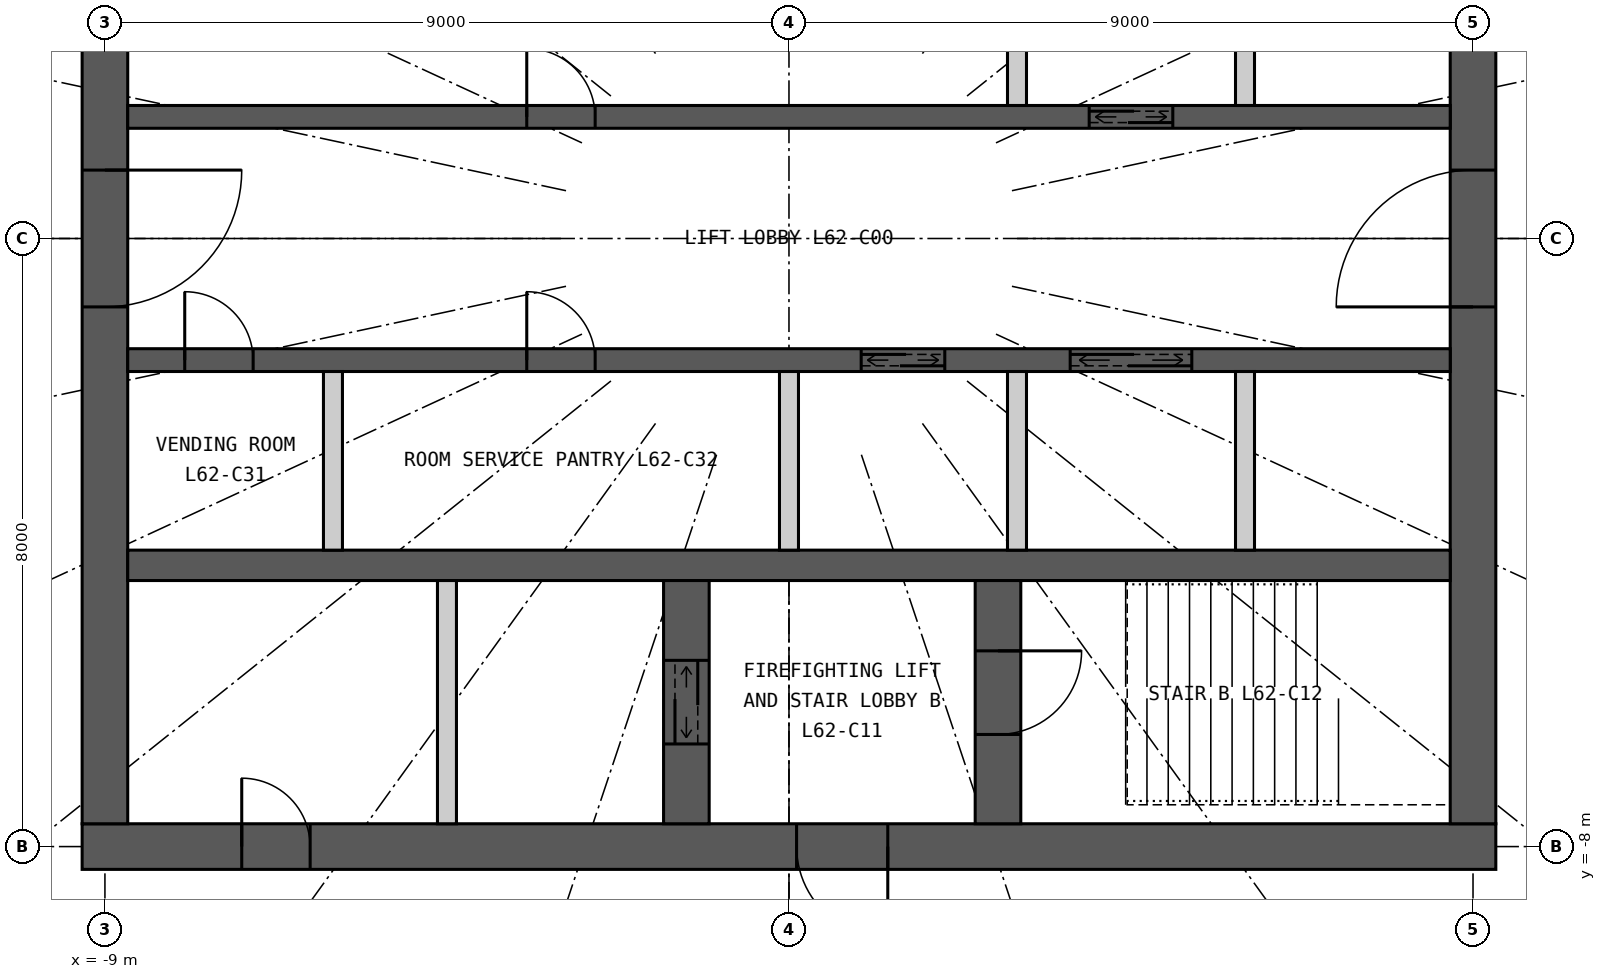
"""IFC4 building model, lengths in metres.
Left out: names, types, materials, properties, quantities, classifications, styles, units other than length and angle.
Written with IfcOpenShell. Run it as: python <this file> out.ifc"""

import sys

from ifc_helpers import new_model, si_unit, direction, frame, frame_2d, origin, place, context, subcontext, project, spatial, rectangle, extrude, element, fill, save


model = new_model("IFC4")
c1 = context("Model", 3, precision=1e-05, world=origin(), true_north=direction((0.0, 1.0)))
c2 = subcontext(c1, "Body", "Model", "MODEL_VIEW")
j1 = project(units=[si_unit("LENGTHUNIT", "METRE"), si_unit("PLANEANGLEUNIT", "RADIAN")], contexts=[c1])
p1 = place(None, origin())
s1 = spatial("IfcSite", under=j1, at=p1, CompositionType="ELEMENT")
p2 = place(p1, origin())
s2 = spatial("IfcBuilding", under=s1, at=p2, CompositionType="ELEMENT")
p3 = place(p2, frame((0.0, 0.0, 229.2)))
s3 = spatial("IfcBuildingStorey", under=s2, at=p3, CompositionType="ELEMENT", Elevation=229.2)
p4 = place(p3, frame((9.3, -8.0, 0.0), z_axis=(0.0, 0.0, 1.0), x_axis=(-1.0, 0.0, 0.0)))
e1 = element("IfcWall", 1, at=p4, inside=s3, PredefinedType="SHEAR", context=c2, shape_type="SweptSolid", body=[
    extrude(rectangle(XDim=18.6, YDim=0.6, at=frame_2d((9.3, 0.0))), origin(), (0.0, 0.0, 1.0), 3.3),
])
p5 = place(p4, frame((8.0, 0.0, 0.0)))
e2 = element("IfcOpeningElement", 2, at=p5, cuts=e1, PredefinedType="OPENING", context=c2, shape_type="SweptSolid", body=[
    extrude(rectangle(XDim=1.2, YDim=2.2, at=frame_2d((0.6, 1.1))), frame((0.0, 0.31, 0.0), z_axis=(0.0, -1.0, 0.0), x_axis=(1.0, 0.0, 0.0)), (0.0, 0.0, 1.0), 0.62),
])
p6 = place(p4, frame((15.6, 0.0, 0.0)))
e3 = element("IfcOpeningElement", 3, at=p6, cuts=e1, PredefinedType="OPENING", context=c2, shape_type="SweptSolid", body=[
    extrude(rectangle(XDim=0.9, YDim=2.2, at=frame_2d((0.45, 1.1))), frame((0.0, 0.31, 0.0), z_axis=(0.0, -1.0, 0.0), x_axis=(1.0, 0.0, 0.0)), (0.0, 0.0, 1.0), 0.62),
])
p7 = place(p3, frame((9.0, -7.7, 0.0), z_axis=(0.0, 0.0, 1.0), x_axis=(0.0, 1.0, 0.0)))
e4 = element("IfcWall", 4, at=p7, inside=s3, PredefinedType="SHEAR", context=c2, shape_type="SweptSolid", body=[
    extrude(rectangle(XDim=15.4, YDim=0.6, at=frame_2d((7.7, 0.0))), origin(), (0.0, 0.0, 1.0), 3.3),
])
p8 = place(p7, frame((6.8, 0.0, 0.0)))
e5 = element("IfcOpeningElement", 5, at=p8, cuts=e4, PredefinedType="OPENING", context=c2, shape_type="SweptSolid", body=[
    extrude(rectangle(XDim=1.8, YDim=2.2, at=frame_2d((0.9, 1.1))), frame((0.0, 0.31, 0.0), z_axis=(0.0, -1.0, 0.0), x_axis=(1.0, 0.0, 0.0)), (0.0, 0.0, 1.0), 0.62),
])
p9 = place(p3, frame((-9.0, 7.7, 0.0), z_axis=(0.0, 0.0, 1.0), x_axis=(0.0, -1.0, 0.0)))
e6 = element("IfcWall", 6, at=p9, inside=s3, PredefinedType="SHEAR", context=c2, shape_type="SweptSolid", body=[
    extrude(rectangle(XDim=15.4, YDim=0.6, at=frame_2d((7.7, 0.0))), origin(), (0.0, 0.0, 1.0), 3.3),
])
p10 = place(p9, frame((6.8, 0.0, 0.0)))
e7 = element("IfcOpeningElement", 7, at=p10, cuts=e6, PredefinedType="OPENING", context=c2, shape_type="SweptSolid", body=[
    extrude(rectangle(XDim=1.8, YDim=2.2, at=frame_2d((0.9, 1.1))), frame((0.0, 0.31, 0.0), z_axis=(0.0, -1.0, 0.0), x_axis=(1.0, 0.0, 0.0)), (0.0, 0.0, 1.0), 0.62),
])
p11 = place(p3, frame((-8.7, 1.6, 0.0), z_axis=(0.0, 0.0, 1.0), x_axis=(1.0, 0.0, 0.0)))
e8 = element("IfcWall", 8, at=p11, inside=s3, PredefinedType="SHEAR", context=c2, shape_type="SweptSolid", body=[
    extrude(rectangle(XDim=17.4, YDim=0.3, at=frame_2d((8.7, 0.0))), origin(), (0.0, 0.0, 1.0), 3.3),
])
p12 = place(p11, frame((12.65, 0.0, 0.0)))
e9 = element("IfcOpeningElement", 9, at=p12, cuts=e8, PredefinedType="OPENING", context=c2, shape_type="SweptSolid", body=[
    extrude(rectangle(XDim=1.1, YDim=2.2, at=frame_2d((0.55, 1.1))), frame((0.0, 0.16, 0.0), z_axis=(0.0, -1.0, 0.0), x_axis=(1.0, 0.0, 0.0)), (0.0, 0.0, 1.0), 0.32),
])
p13 = place(p11, frame((5.25, 0.0, 0.0)))
e10 = element("IfcOpeningElement", 10, at=p13, cuts=e8, PredefinedType="OPENING", context=c2, shape_type="SweptSolid", body=[
    extrude(rectangle(XDim=0.9, YDim=2.2, at=frame_2d((0.45, 1.1))), frame((0.0, 0.16, 0.0), z_axis=(0.0, -1.0, 0.0), x_axis=(1.0, 0.0, 0.0)), (0.0, 0.0, 1.0), 0.32),
])
p14 = place(p3, frame((-8.7, -4.3, 0.0), z_axis=(0.0, 0.0, 1.0), x_axis=(1.0, 0.0, 0.0)))
e11 = element("IfcWall", 11, at=p14, inside=s3, PredefinedType="SHEAR", context=c2, shape_type="SweptSolid", body=[
    extrude(rectangle(XDim=17.4, YDim=0.4, at=frame_2d((8.7, 0.0))), origin(), (0.0, 0.0, 1.0), 3.3),
])
p15 = place(p3, frame((-8.7, -1.6, 0.0), z_axis=(0.0, 0.0, 1.0), x_axis=(1.0, 0.0, 0.0)))
e12 = element("IfcWall", 12, at=p15, inside=s3, PredefinedType="SHEAR", context=c2, shape_type="SweptSolid", body=[
    extrude(rectangle(XDim=17.4, YDim=0.3, at=frame_2d((8.7, 0.0))), origin(), (0.0, 0.0, 1.0), 3.3),
])
p16 = place(p15, frame((9.65, 0.0, 0.0)))
e13 = element("IfcOpeningElement", 13, at=p16, cuts=e12, PredefinedType="OPENING", context=c2, shape_type="SweptSolid", body=[
    extrude(rectangle(XDim=1.1, YDim=2.2, at=frame_2d((0.55, 1.1))), frame((0.0, 0.16, 0.0), z_axis=(0.0, -1.0, 0.0), x_axis=(1.0, 0.0, 0.0)), (0.0, 0.0, 1.0), 0.32),
])
p17 = place(p15, frame((12.4, 0.0, 0.0)))
e14 = element("IfcOpeningElement", 14, at=p17, cuts=e12, PredefinedType="OPENING", context=c2, shape_type="SweptSolid", body=[
    extrude(rectangle(XDim=1.6, YDim=2.4, at=frame_2d((0.8, 1.2))), frame((0.0, 0.16, 0.0), z_axis=(0.0, -1.0, 0.0), x_axis=(1.0, 0.0, 0.0)), (0.0, 0.0, 1.0), 0.32),
])
p18 = place(p15, frame((0.75, 0.0, 0.0)))
e15 = element("IfcOpeningElement", 15, at=p18, cuts=e12, PredefinedType="OPENING", context=c2, shape_type="SweptSolid", body=[
    extrude(rectangle(XDim=0.9, YDim=2.2, at=frame_2d((0.45, 1.1))), frame((0.0, 0.16, 0.0), z_axis=(0.0, -1.0, 0.0), x_axis=(1.0, 0.0, 0.0)), (0.0, 0.0, 1.0), 0.32),
])
p19 = place(p15, frame((5.25, 0.0, 0.0)))
e16 = element("IfcOpeningElement", 16, at=p19, cuts=e12, PredefinedType="OPENING", context=c2, shape_type="SweptSolid", body=[
    extrude(rectangle(XDim=0.9, YDim=2.2, at=frame_2d((0.45, 1.1))), frame((0.0, 0.16, 0.0), z_axis=(0.0, -1.0, 0.0), x_axis=(1.0, 0.0, 0.0)), (0.0, 0.0, 1.0), 0.32),
])
p20 = place(p3, frame((2.75, -7.7, 0.0), z_axis=(0.0, 0.0, 1.0), x_axis=(0.0, 1.0, 0.0)))
e17 = element("IfcWall", 17, at=p20, inside=s3, PredefinedType="SHEAR", context=c2, shape_type="SweptSolid", body=[
    extrude(rectangle(XDim=3.2, YDim=0.6, at=frame_2d((1.6, 0.0))), origin(), (0.0, 0.0, 1.0), 3.3),
])
p21 = place(p20, frame((1.175, 0.0, 0.0)))
e18 = element("IfcOpeningElement", 18, at=p21, cuts=e17, PredefinedType="OPENING", context=c2, shape_type="SweptSolid", body=[
    extrude(rectangle(XDim=1.1, YDim=2.2, at=frame_2d((0.55, 1.1))), frame((0.0, 0.31, 0.0), z_axis=(0.0, -1.0, 0.0), x_axis=(1.0, 0.0, 0.0)), (0.0, 0.0, 1.0), 0.62),
])
p22 = place(p3, frame((-1.35, -7.7, 0.0), z_axis=(0.0, 0.0, 1.0), x_axis=(0.0, 1.0, 0.0)))
e19 = element("IfcWall", 19, at=p22, inside=s3, PredefinedType="SHEAR", context=c2, shape_type="SweptSolid", body=[
    extrude(rectangle(XDim=3.2, YDim=0.6, at=frame_2d((1.6, 0.0))), origin(), (0.0, 0.0, 1.0), 3.3),
])
p23 = place(p22, frame((1.05, 0.0, 0.0)))
e20 = element("IfcOpeningElement", 20, at=p23, cuts=e19, PredefinedType="OPENING", context=c2, shape_type="SweptSolid", body=[
    extrude(rectangle(XDim=1.1, YDim=2.2, at=frame_2d((0.55, 1.1))), frame((0.0, 0.31, 0.0), z_axis=(0.0, -1.0, 0.0), x_axis=(1.0, 0.0, 0.0)), (0.0, 0.0, 1.0), 0.62),
])
p24 = place(p3, frame((-4.5, -7.7, 0.0), z_axis=(0.0, 0.0, 1.0), x_axis=(0.0, 1.0, 0.0)))
e21 = element("IfcWall", 21, at=p24, inside=s3, PredefinedType="PARTITIONING", context=c2, shape_type="SweptSolid", body=[
    extrude(rectangle(XDim=3.2, YDim=0.25, at=frame_2d((1.6, 0.0))), origin(), (0.0, 0.0, 1.0), 3.3),
])
for number, where, z_axis, x_axis in (
    (22, (3.0, 1.75, 0.0), (0.0, 0.0, 1.0), (0.0, 1.0, 0.0)),
    (23, (6.0, 1.75, 0.0), (0.0, 0.0, 1.0), (0.0, 1.0, 0.0)),
    (24, (-6.0, -4.1, 0.0), (0.0, 0.0, 1.0), (0.0, 1.0, 0.0)),
    (25, (0.0, -4.1, 0.0), (0.0, 0.0, 1.0), (0.0, 1.0, 0.0)),
    (26, (3.0, -4.1, 0.0), (0.0, 0.0, 1.0), (0.0, 1.0, 0.0)),
    (27, (6.0, -4.1, 0.0), (0.0, 0.0, 1.0), (0.0, 1.0, 0.0)),
):
    element("IfcWall", number, at=place(p3, frame(where, z_axis=z_axis, x_axis=x_axis)), inside=s3, PredefinedType="PARTITIONING", context=c2, shape_type="SweptSolid", body=[
        extrude(rectangle(XDim=2.35, YDim=0.25, at=frame_2d((1.175, 0.0))), origin(), (0.0, 0.0, 1.0), 3.3),
    ])
p25 = place(p5, origin())
e28 = element("IfcDoor", 28, at=p25, inside=s3, OperationType="SINGLE_SWING_LEFT", PredefinedType="DOOR", context=c2, shape_type="SweptSolid", body=[
    extrude(rectangle(XDim=1.2, YDim=2.2, at=frame_2d((0.6, 1.1))), frame((0.0, 0.025, 0.0), z_axis=(0.0, -1.0, 0.0), x_axis=(1.0, 0.0, 0.0)), (0.0, 0.0, 1.0), 0.05),
])
fill(e2, e28)
p26 = place(p21, origin())
e29 = element("IfcDoor", 29, at=p26, inside=s3, OperationType="SINGLE_SWING_RIGHT", PredefinedType="DOOR", context=c2, shape_type="SweptSolid", body=[
    extrude(rectangle(XDim=1.1, YDim=2.2, at=frame_2d((0.55, 1.1))), frame((0.0, 0.025, 0.0), z_axis=(0.0, -1.0, 0.0), x_axis=(1.0, 0.0, 0.0)), (0.0, 0.0, 1.0), 0.05),
])
fill(e18, e29)
p27 = place(p23, origin())
e30 = element("IfcDoor", 30, at=p27, inside=s3, OperationType="DOUBLE_DOOR_SLIDING", PredefinedType="DOOR", context=c2, shape_type="SweptSolid", body=[
    extrude(rectangle(XDim=1.1, YDim=2.2, at=frame_2d((0.55, 1.1))), frame((0.0, 0.025, 0.0), z_axis=(0.0, -1.0, 0.0), x_axis=(1.0, 0.0, 0.0)), (0.0, 0.0, 1.0), 0.05),
])
fill(e20, e30)
p28 = place(p6, origin())
e31 = element("IfcDoor", 31, at=p28, inside=s3, OperationType="SINGLE_SWING_RIGHT", PredefinedType="DOOR", context=c2, shape_type="SweptSolid", body=[
    extrude(rectangle(XDim=0.9, YDim=2.2, at=frame_2d((0.45, 1.1))), frame((0.0, 0.025, 0.0), z_axis=(0.0, -1.0, 0.0), x_axis=(1.0, 0.0, 0.0)), (0.0, 0.0, 1.0), 0.05),
])
fill(e3, e31)
p29 = place(p12, origin())
e32 = element("IfcDoor", 32, at=p29, inside=s3, OperationType="DOUBLE_DOOR_SLIDING", PredefinedType="DOOR", context=c2, shape_type="SweptSolid", body=[
    extrude(rectangle(XDim=1.1, YDim=2.2, at=frame_2d((0.55, 1.1))), frame((0.0, 0.025, 0.0), z_axis=(0.0, -1.0, 0.0), x_axis=(1.0, 0.0, 0.0)), (0.0, 0.0, 1.0), 0.05),
])
fill(e9, e32)
p30 = place(p16, origin())
e33 = element("IfcDoor", 33, at=p30, inside=s3, OperationType="DOUBLE_DOOR_SLIDING", PredefinedType="DOOR", context=c2, shape_type="SweptSolid", body=[
    extrude(rectangle(XDim=1.1, YDim=2.2, at=frame_2d((0.55, 1.1))), frame((0.0, 0.025, 0.0), z_axis=(0.0, -1.0, 0.0), x_axis=(1.0, 0.0, 0.0)), (0.0, 0.0, 1.0), 0.05),
])
fill(e13, e33)
p31 = place(p17, origin())
e34 = element("IfcDoor", 34, at=p31, inside=s3, OperationType="DOUBLE_DOOR_SLIDING", PredefinedType="DOOR", context=c2, shape_type="SweptSolid", body=[
    extrude(rectangle(XDim=1.6, YDim=2.4, at=frame_2d((0.8, 1.2))), frame((0.0, 0.025, 0.0), z_axis=(0.0, -1.0, 0.0), x_axis=(1.0, 0.0, 0.0)), (0.0, 0.0, 1.0), 0.05),
])
fill(e14, e34)
p32 = place(p13, origin())
e35 = element("IfcDoor", 35, at=p32, inside=s3, OperationType="SINGLE_SWING_LEFT", PredefinedType="DOOR", context=c2, shape_type="SweptSolid", body=[
    extrude(rectangle(XDim=0.9, YDim=2.2, at=frame_2d((0.45, 1.1))), frame((0.0, 0.025, 0.0), z_axis=(0.0, -1.0, 0.0), x_axis=(1.0, 0.0, 0.0)), (0.0, 0.0, 1.0), 0.05),
])
fill(e10, e35)
p33 = place(p18, origin())
e36 = element("IfcDoor", 36, at=p33, inside=s3, OperationType="SINGLE_SWING_LEFT", PredefinedType="DOOR", context=c2, shape_type="SweptSolid", body=[
    extrude(rectangle(XDim=0.9, YDim=2.2, at=frame_2d((0.45, 1.1))), frame((0.0, 0.025, 0.0), z_axis=(0.0, -1.0, 0.0), x_axis=(1.0, 0.0, 0.0)), (0.0, 0.0, 1.0), 0.05),
])
fill(e15, e36)
p34 = place(p19, origin())
e37 = element("IfcDoor", 37, at=p34, inside=s3, OperationType="SINGLE_SWING_LEFT", PredefinedType="DOOR", context=c2, shape_type="SweptSolid", body=[
    extrude(rectangle(XDim=0.9, YDim=2.2, at=frame_2d((0.45, 1.1))), frame((0.0, 0.025, 0.0), z_axis=(0.0, -1.0, 0.0), x_axis=(1.0, 0.0, 0.0)), (0.0, 0.0, 1.0), 0.05),
])
fill(e16, e37)
p35 = place(p8, origin())
e38 = element("IfcDoor", 38, at=p35, inside=s3, OperationType="DOUBLE_DOOR_DOUBLE_SWING", PredefinedType="DOOR", context=c2, shape_type="SweptSolid", body=[
    extrude(rectangle(XDim=1.8, YDim=2.2, at=frame_2d((0.9, 1.1))), frame((0.0, 0.025, 0.0), z_axis=(0.0, -1.0, 0.0), x_axis=(1.0, 0.0, 0.0)), (0.0, 0.0, 1.0), 0.05),
])
fill(e5, e38)
p36 = place(p10, origin())
e39 = element("IfcDoor", 39, at=p36, inside=s3, OperationType="DOUBLE_DOOR_DOUBLE_SWING", PredefinedType="DOOR", context=c2, shape_type="SweptSolid", body=[
    extrude(rectangle(XDim=1.8, YDim=2.2, at=frame_2d((0.9, 1.1))), frame((0.0, 0.025, 0.0), z_axis=(0.0, -1.0, 0.0), x_axis=(1.0, 0.0, 0.0)), (0.0, 0.0, 1.0), 0.05),
])
fill(e7, e39)
save(model, sys.argv[1])
